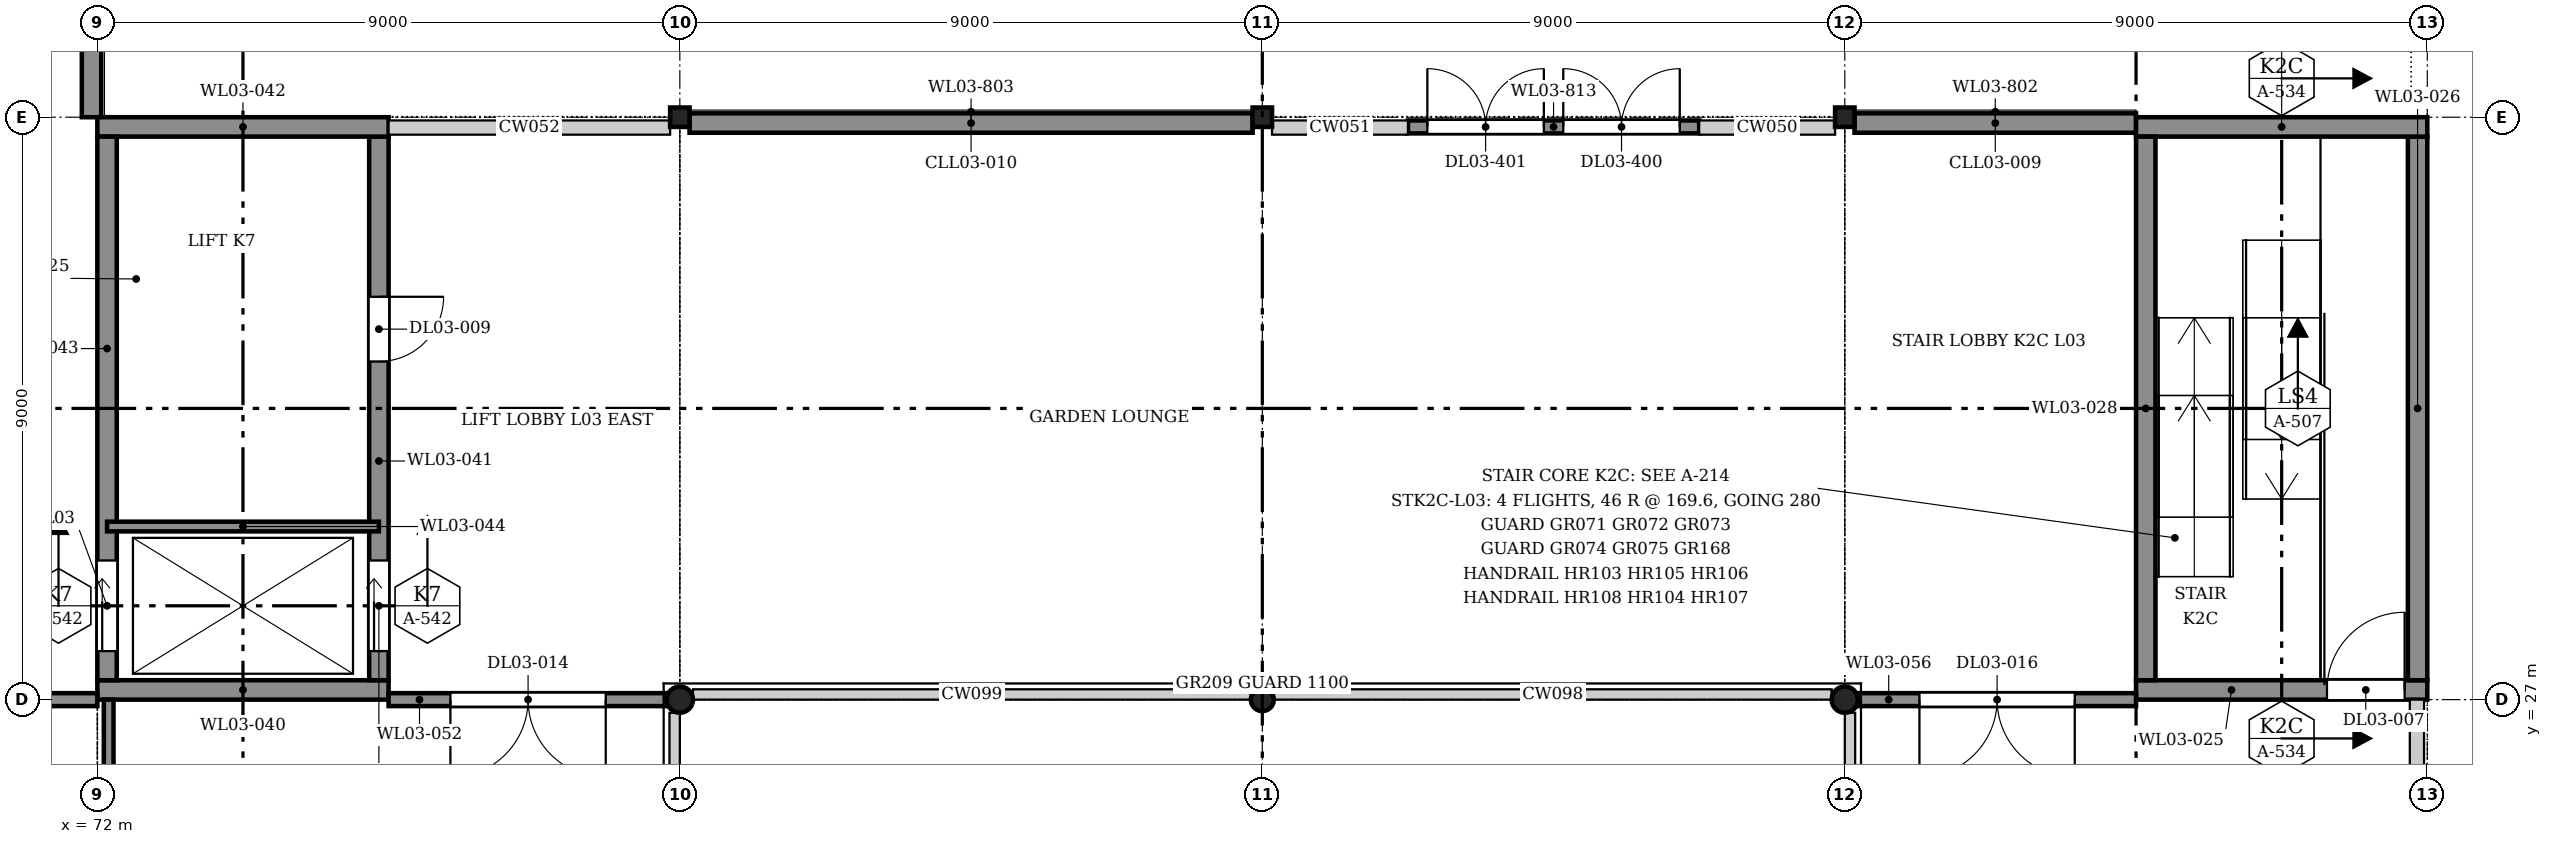
"""IFC4 building model, lengths in metres.
Left out: names, types, materials, properties, quantities, classifications, styles, units other than length and angle.
Written with IfcOpenShell. Run it as: python <this file> out.ifc"""

import sys

from ifc_helpers import new_model, si_unit, direction, frame, frame_2d, origin, origin_2d, place, context, subcontext, project, spatial, rectangle, hollow_rectangle, hollow_circle, extrude, element, fill, save


model = new_model("IFC4")
c1 = context("Model", 3, precision=1e-05, world=origin(), true_north=direction((0.0, 1.0)))
c2 = subcontext(c1, "Body", "Model", "MODEL_VIEW")
j1 = project(units=[si_unit("LENGTHUNIT", "METRE"), si_unit("PLANEANGLEUNIT", "RADIAN")], contexts=[c1])
p1 = place(None, origin())
s1 = spatial("IfcSite", under=j1, at=p1, CompositionType="ELEMENT")
p2 = place(p1, origin())
s2 = spatial("IfcBuilding", under=s1, at=p2, CompositionType="ELEMENT")
p3 = place(p2, frame((0.0, 0.0, 13.4)))
s3 = spatial("IfcBuildingStorey", under=s2, at=p3, CompositionType="ELEMENT", Elevation=13.4)
p4 = place(p3, frame((81.0, 27.0, 0.0), z_axis=(0.0, 0.0, 1.0), x_axis=(1.0, 0.0, 0.0)))
e1 = element("IfcColumn", 1, at=p4, inside=s3, PredefinedType="COLUMN", context=c2, shape_type="SweptSolid", body=[
    extrude(hollow_circle(Radius=0.203, WallThickness=0.013, at=origin_2d()), origin(), (0.0, 0.0, 1.0), 7.8),
])
p5 = place(p3, frame((90.0, 27.0, 0.0), z_axis=(0.0, 0.0, 1.0), x_axis=(1.0, 0.0, 0.0)))
e2 = element("IfcColumn", 2, at=p5, inside=s3, PredefinedType="COLUMN", context=c2, shape_type="SweptSolid", body=[
    extrude(hollow_circle(Radius=0.178, WallThickness=0.013, at=origin_2d()), origin(), (0.0, 0.0, 1.0), 7.8),
])
p6 = place(p3, frame((99.0, 27.0, 0.0), z_axis=(0.0, 0.0, 1.0), x_axis=(1.0, 0.0, 0.0)))
e3 = element("IfcColumn", 3, at=p6, inside=s3, PredefinedType="COLUMN", context=c2, shape_type="SweptSolid", body=[
    extrude(hollow_circle(Radius=0.203, WallThickness=0.013, at=origin_2d()), origin(), (0.0, 0.0, 1.0), 7.8),
])
p7 = place(p3, frame((81.0, 36.0, 0.0), z_axis=(0.0, 0.0, 1.0), x_axis=(1.0, 0.0, 0.0)))
e4 = element("IfcColumn", 4, at=p7, inside=s3, PredefinedType="COLUMN", context=c2, shape_type="SweptSolid", body=[
    extrude(hollow_rectangle(XDim=0.3, YDim=0.3, WallThickness=0.016, InnerFilletRadius=0.024, OuterFilletRadius=0.04, at=origin_2d()), origin(), (0.0, 0.0, 1.0), 7.8),
])
p8 = place(p3, frame((90.0, 36.0, 0.0), z_axis=(0.0, 0.0, 1.0), x_axis=(1.0, 0.0, 0.0)))
e5 = element("IfcColumn", 5, at=p8, inside=s3, PredefinedType="COLUMN", context=c2, shape_type="SweptSolid", body=[
    extrude(hollow_rectangle(XDim=0.3, YDim=0.3, WallThickness=0.01, InnerFilletRadius=0.015, OuterFilletRadius=0.025, at=origin_2d()), origin(), (0.0, 0.0, 1.0), 7.8),
])
p9 = place(p3, frame((99.0, 36.0, 0.0), z_axis=(0.0, 0.0, 1.0), x_axis=(1.0, 0.0, 0.0)))
e6 = element("IfcColumn", 6, at=p9, inside=s3, PredefinedType="COLUMN", context=c2, shape_type="SweptSolid", body=[
    extrude(hollow_rectangle(XDim=0.3, YDim=0.3, WallThickness=0.016, InnerFilletRadius=0.024, OuterFilletRadius=0.04, at=origin_2d()), origin(), (0.0, 0.0, 1.0), 7.8),
])
p10 = place(p3, frame((99.15, 35.91, 0.0), z_axis=(0.0, 0.0, 1.0), x_axis=(1.0, 0.0, 0.0)))
e7 = element("IfcWall", 7, at=p10, inside=s3, PredefinedType="SOLIDWALL", context=c2, shape_type="SweptSolid", body=[
    extrude(rectangle(XDim=4.35, YDim=0.3, at=frame_2d((2.175, 0.0))), origin(), (0.0, 0.0, 1.0), 6.935),
])
p11 = place(p3, frame((81.15, 35.91, 0.0), z_axis=(0.0, 0.0, 1.0), x_axis=(1.0, 0.0, 0.0)))
e8 = element("IfcWall", 8, at=p11, inside=s3, PredefinedType="SOLIDWALL", context=c2, shape_type="SweptSolid", body=[
    extrude(rectangle(XDim=8.7, YDim=0.3, at=frame_2d((4.35, 0.0))), origin(), (0.0, 0.0, 1.0), 6.935),
])
p12 = place(p3, frame((71.91, 36.0, 0.0), z_axis=(0.0, 0.0, 1.0), x_axis=(0.0, 1.0, 0.0)))
e9 = element("IfcWall", 9, at=p12, inside=s3, PredefinedType="SOLIDWALL", context=c2, shape_type="SweptSolid", body=[
    extrude(rectangle(XDim=4.5, YDim=0.3, at=frame_2d((2.25, 0.0))), origin(), (0.0, 0.0, 1.0), 7.678),
])
p13 = place(p3, frame((92.25, 35.85, 0.0), z_axis=(0.0, 0.0, 1.0), x_axis=(1.0, 0.0, 0.0)))
e10 = element("IfcWall", 10, at=p13, inside=s3, PredefinedType="SOLIDWALL", context=c2, shape_type="SweptSolid", body=[
    extrude(rectangle(XDim=4.5, YDim=0.2, at=frame_2d((2.25, 0.0))), origin(), (0.0, 0.0, 1.0), 7.635),
])
p14 = place(p13, frame((2.4, 0.0, 0.0)))
e11 = element("IfcOpeningElement", 11, at=p14, cuts=e10, PredefinedType="OPENING", context=c2, shape_type="SweptSolid", body=[
    extrude(rectangle(XDim=1.8, YDim=2.4, at=frame_2d((0.9, 1.2))), frame((0.0, 0.11, 0.0), z_axis=(0.0, -1.0, 0.0), x_axis=(1.0, 0.0, 0.0)), (0.0, 0.0, 1.0), 0.22),
])
p15 = place(p13, frame((0.3, 0.0, 0.0)))
e12 = element("IfcOpeningElement", 12, at=p15, cuts=e10, PredefinedType="OPENING", context=c2, shape_type="SweptSolid", body=[
    extrude(rectangle(XDim=1.8, YDim=2.4, at=frame_2d((0.9, 1.2))), frame((0.0, 0.11, 0.0), z_axis=(0.0, -1.0, 0.0), x_axis=(1.0, 0.0, 0.0)), (0.0, 0.0, 1.0), 0.22),
])
p16 = place(p3, frame((103.5, 27.15, 0.0), z_axis=(0.0, 0.0, 1.0), x_axis=(1.0, 0.0, 0.0)))
e13 = element("IfcWall", 13, at=p16, inside=s3, PredefinedType="SOLIDWALL", context=c2, shape_type="SweptSolid", body=[
    extrude(rectangle(XDim=4.5, YDim=0.3, at=frame_2d((2.25, 0.0))), origin(), (0.0, 0.0, 1.0), 7.8),
])
p17 = place(p16, frame((2.95, 0.0, 0.0)))
e14 = element("IfcOpeningElement", 14, at=p17, cuts=e13, PredefinedType="OPENING", context=c2, shape_type="SweptSolid", body=[
    extrude(rectangle(XDim=1.2, YDim=2.1, at=frame_2d((0.6, 1.05))), frame((0.0, 0.16, 0.0), z_axis=(0.0, -1.0, 0.0), x_axis=(1.0, 0.0, 0.0)), (0.0, 0.0, 1.0), 0.32),
])
p18 = place(p3, frame((107.85, 27.3, 0.0), z_axis=(0.0, 0.0, 1.0), x_axis=(0.0, 1.0, 0.0)))
e15 = element("IfcWall", 15, at=p18, inside=s3, PredefinedType="SOLIDWALL", context=c2, shape_type="SweptSolid", body=[
    extrude(rectangle(XDim=8.4, YDim=0.3, at=frame_2d((4.2, 0.0))), origin(), (0.0, 0.0, 1.0), 7.8),
])
p19 = place(p3, frame((103.5, 35.85, 0.0), z_axis=(0.0, 0.0, 1.0), x_axis=(1.0, 0.0, 0.0)))
e16 = element("IfcWall", 16, at=p19, inside=s3, PredefinedType="SOLIDWALL", context=c2, shape_type="SweptSolid", body=[
    extrude(rectangle(XDim=4.5, YDim=0.3, at=frame_2d((2.25, 0.0))), origin(), (0.0, 0.0, 1.0), 7.8),
])
p20 = place(p3, frame((103.65, 27.3, 0.0), z_axis=(0.0, 0.0, 1.0), x_axis=(0.0, 1.0, 0.0)))
e17 = element("IfcWall", 17, at=p20, inside=s3, PredefinedType="SOLIDWALL", context=c2, shape_type="SweptSolid", body=[
    extrude(rectangle(XDim=8.4, YDim=0.3, at=frame_2d((4.2, 0.0))), origin(), (0.0, 0.0, 1.0), 7.8),
])
p21 = place(p3, frame((72.0, 27.15, 0.0), z_axis=(0.0, 0.0, 1.0), x_axis=(1.0, 0.0, 0.0)))
e18 = element("IfcWall", 18, at=p21, inside=s3, PredefinedType="SOLIDWALL", context=c2, shape_type="SweptSolid", body=[
    extrude(rectangle(XDim=4.5, YDim=0.3, at=frame_2d((2.25, 0.0))), origin(), (0.0, 0.0, 1.0), 7.8),
])
p22 = place(p3, frame((76.35, 27.3, 0.0), z_axis=(0.0, 0.0, 1.0), x_axis=(0.0, 1.0, 0.0)))
e19 = element("IfcWall", 19, at=p22, inside=s3, PredefinedType="SOLIDWALL", context=c2, shape_type="SweptSolid", body=[
    extrude(rectangle(XDim=8.4, YDim=0.3, at=frame_2d((4.2, 0.0))), origin(), (0.0, 0.0, 1.0), 7.8),
])
p23 = place(p22, frame((0.45, 0.0, 0.0)))
e20 = element("IfcOpeningElement", 20, at=p23, cuts=e19, PredefinedType="OPENING", context=c2, shape_type="SweptSolid", body=[
    extrude(rectangle(XDim=1.4, YDim=2.1, at=frame_2d((0.7, 1.05))), frame((0.0, 0.16, 0.0), z_axis=(0.0, -1.0, 0.0), x_axis=(1.0, 0.0, 0.0)), (0.0, 0.0, 1.0), 0.32),
])
p24 = place(p22, frame((4.925, 0.0, 0.0)))
e21 = element("IfcOpeningElement", 21, at=p24, cuts=e19, PredefinedType="OPENING", context=c2, shape_type="SweptSolid", body=[
    extrude(rectangle(XDim=1.0, YDim=2.1, at=frame_2d((0.5, 1.05))), frame((0.0, 0.16, 0.0), z_axis=(0.0, -1.0, 0.0), x_axis=(1.0, 0.0, 0.0)), (0.0, 0.0, 1.0), 0.32),
])
p25 = place(p3, frame((72.0, 35.85, 0.0), z_axis=(0.0, 0.0, 1.0), x_axis=(1.0, 0.0, 0.0)))
e22 = element("IfcWall", 22, at=p25, inside=s3, PredefinedType="SOLIDWALL", context=c2, shape_type="SweptSolid", body=[
    extrude(rectangle(XDim=4.5, YDim=0.3, at=frame_2d((2.25, 0.0))), origin(), (0.0, 0.0, 1.0), 7.8),
])
p26 = place(p3, frame((72.15, 27.3, 0.0), z_axis=(0.0, 0.0, 1.0), x_axis=(0.0, 1.0, 0.0)))
e23 = element("IfcWall", 23, at=p26, inside=s3, PredefinedType="SOLIDWALL", context=c2, shape_type="SweptSolid", body=[
    extrude(rectangle(XDim=8.4, YDim=0.3, at=frame_2d((4.2, 0.0))), origin(), (0.0, 0.0, 1.0), 7.8),
])
p27 = place(p26, frame((0.45, 0.0, 0.0)))
e24 = element("IfcOpeningElement", 24, at=p27, cuts=e23, PredefinedType="OPENING", context=c2, shape_type="SweptSolid", body=[
    extrude(rectangle(XDim=1.4, YDim=2.1, at=frame_2d((0.7, 1.05))), frame((0.0, 0.16, 0.0), z_axis=(0.0, -1.0, 0.0), x_axis=(1.0, 0.0, 0.0)), (0.0, 0.0, 1.0), 0.32),
])
p28 = place(p3, frame((72.15, 29.675, 0.0), z_axis=(0.0, 0.0, 1.0), x_axis=(1.0, 0.0, 0.0)))
e25 = element("IfcWall", 25, at=p28, inside=s3, PredefinedType="SOLIDWALL", context=c2, shape_type="SweptSolid", body=[
    extrude(rectangle(XDim=4.2, YDim=0.15, at=frame_2d((2.1, 0.0))), origin(), (0.0, 0.0, 1.0), 7.8),
])
p29 = place(p3, frame((63.153, 27.0, 0.0), z_axis=(0.0, 0.0, 1.0), x_axis=(1.0, 0.0, 0.0)))
e26 = element("IfcWall", 26, at=p29, inside=s3, PredefinedType="PARTITIONING", context=c2, shape_type="SweptSolid", body=[
    extrude(rectangle(XDim=8.847, YDim=0.2, at=frame_2d((4.424, 0.0))), origin(), (0.0, 0.0, 1.0), 7.232),
])
p30 = place(p29, frame((3.25, 0.0, 0.0)))
e27 = element("IfcOpeningElement", 27, at=p30, cuts=e26, PredefinedType="OPENING", context=c2, shape_type="SweptSolid", body=[
    extrude(rectangle(XDim=2.4, YDim=2.4, at=frame_2d((1.2, 1.2))), frame((0.0, 0.11, 0.0), z_axis=(0.0, -1.0, 0.0), x_axis=(1.0, 0.0, 0.0)), (0.0, 0.0, 1.0), 0.22),
])
p31 = place(p3, frame((72.175, 22.5, 0.0), z_axis=(0.0, 0.0, 1.0), x_axis=(0.0, 1.0, 0.0)))
e28 = element("IfcWall", 28, at=p31, inside=s3, PredefinedType="PARTITIONING", context=c2, shape_type="SweptSolid", body=[
    extrude(rectangle(XDim=4.5, YDim=0.15, at=frame_2d((2.25, 0.0))), origin(), (0.0, 0.0, 1.0), 7.635),
])
p32 = place(p3, frame((76.5, 27.0, 0.0), z_axis=(0.0, 0.0, 1.0), x_axis=(1.0, 0.0, 0.0)))
e29 = element("IfcWall", 29, at=p32, inside=s3, PredefinedType="PARTITIONING", context=c2, shape_type="SweptSolid", body=[
    extrude(rectangle(XDim=4.297, YDim=0.2, at=frame_2d((2.148, 0.0))), origin(), (0.0, 0.0, 1.0), 7.175),
])
p33 = place(p32, frame((0.955, 0.0, 0.0)))
e30 = element("IfcOpeningElement", 30, at=p33, cuts=e29, PredefinedType="OPENING", context=c2, shape_type="SweptSolid", body=[
    extrude(rectangle(XDim=2.4, YDim=2.4, at=frame_2d((1.2, 1.2))), frame((0.0, 0.11, 0.0), z_axis=(0.0, -1.0, 0.0), x_axis=(1.0, 0.0, 0.0)), (0.0, 0.0, 1.0), 0.22),
])
p34 = place(p3, frame((99.203, 27.0, 0.0), z_axis=(0.0, 0.0, 1.0), x_axis=(1.0, 0.0, 0.0)))
e31 = element("IfcWall", 31, at=p34, inside=s3, PredefinedType="PARTITIONING", context=c2, shape_type="SweptSolid", body=[
    extrude(rectangle(XDim=4.297, YDim=0.2, at=frame_2d((2.148, 0.0))), origin(), (0.0, 0.0, 1.0), 7.175),
])
p35 = place(p34, frame((0.95, 0.0, 0.0)))
e32 = element("IfcOpeningElement", 32, at=p35, cuts=e31, PredefinedType="OPENING", context=c2, shape_type="SweptSolid", body=[
    extrude(rectangle(XDim=2.4, YDim=2.4, at=frame_2d((1.2, 1.2))), frame((0.0, 0.11, 0.0), z_axis=(0.0, -1.0, 0.0), x_axis=(1.0, 0.0, 0.0)), (0.0, 0.0, 1.0), 0.22),
])
p36 = place(p14, origin())
e33 = element("IfcDoor", 33, at=p36, inside=s3, OperationType="DOUBLE_DOOR_SINGLE_SWING", PredefinedType="DOOR", context=c2, shape_type="SweptSolid", body=[
    extrude(rectangle(XDim=1.8, YDim=2.4, at=frame_2d((0.9, 1.2))), frame((0.0, 0.025, 0.0), z_axis=(0.0, -1.0, 0.0), x_axis=(1.0, 0.0, 0.0)), (0.0, 0.0, 1.0), 0.05),
])
fill(e11, e33)
p37 = place(p15, origin())
e34 = element("IfcDoor", 34, at=p37, inside=s3, OperationType="DOUBLE_DOOR_SINGLE_SWING", PredefinedType="DOOR", context=c2, shape_type="SweptSolid", body=[
    extrude(rectangle(XDim=1.8, YDim=2.4, at=frame_2d((0.9, 1.2))), frame((0.0, 0.025, 0.0), z_axis=(0.0, -1.0, 0.0), x_axis=(1.0, 0.0, 0.0)), (0.0, 0.0, 1.0), 0.05),
])
fill(e12, e34)
p38 = place(p2, frame((0.0, 0.0, 21.2)))
p39 = place(p38, frame((27.0, 27.125, -0.146), z_axis=(0.0, 0.0, 1.0), x_axis=(1.0, 0.0, 0.0)))
p40 = place(p39, frame((40.95, 0.0, 0.15)))
p41 = place(p40, origin())
e35 = element("IfcWindow", 35, at=p41, inside=s3, PartitioningType="SINGLE_PANEL", PredefinedType="SKYLIGHT", context=c2, shape_type="SweptSolid", body=[
    extrude(rectangle(XDim=3.6, YDim=1.0, at=frame_2d((1.8, 0.5))), frame((0.0, 0.03, 0.0), z_axis=(0.0, -1.0, 0.0), x_axis=(1.0, 0.0, 0.0)), (0.0, 0.0, 1.0), 0.06),
])
p42 = place(p38, frame((62.85, 36.125, -0.122), z_axis=(0.0, 0.0, 1.0), x_axis=(1.0, 0.0, 0.0)))
p43 = place(p42, frame((5.1, 0.0, 0.15)))
p44 = place(p43, origin())
e36 = element("IfcWindow", 36, at=p44, inside=s3, PartitioningType="SINGLE_PANEL", PredefinedType="SKYLIGHT", context=c2, shape_type="SweptSolid", body=[
    extrude(rectangle(XDim=3.6, YDim=1.0, at=frame_2d((1.8, 0.5))), frame((0.0, 0.03, 0.0), z_axis=(0.0, -1.0, 0.0), x_axis=(1.0, 0.0, 0.0)), (0.0, 0.0, 1.0), 0.06),
])
p45 = place(p17, origin())
e37 = element("IfcDoor", 37, at=p45, inside=s3, OperationType="SINGLE_SWING_LEFT", PredefinedType="DOOR", context=c2, shape_type="SweptSolid", body=[
    extrude(rectangle(XDim=1.2, YDim=2.1, at=frame_2d((0.6, 1.05))), frame((0.0, 0.025, 0.0), z_axis=(0.0, -1.0, 0.0), x_axis=(1.0, 0.0, 0.0)), (0.0, 0.0, 1.0), 0.05),
])
fill(e14, e37)
p46 = place(p23, origin())
e38 = element("IfcDoor", 38, at=p46, inside=s3, OperationType="SLIDING_TO_LEFT", PredefinedType="DOOR", context=c2, shape_type="SweptSolid", body=[
    extrude(rectangle(XDim=1.4, YDim=2.1, at=frame_2d((0.7, 1.05))), frame((0.0, 0.025, 0.0), z_axis=(0.0, -1.0, 0.0), x_axis=(1.0, 0.0, 0.0)), (0.0, 0.0, 1.0), 0.05),
])
fill(e20, e38)
p47 = place(p27, origin())
e39 = element("IfcDoor", 39, at=p47, inside=s3, OperationType="SLIDING_TO_RIGHT", PredefinedType="DOOR", context=c2, shape_type="SweptSolid", body=[
    extrude(rectangle(XDim=1.4, YDim=2.1, at=frame_2d((0.7, 1.05))), frame((0.0, 0.025, 0.0), z_axis=(0.0, -1.0, 0.0), x_axis=(1.0, 0.0, 0.0)), (0.0, 0.0, 1.0), 0.05),
])
fill(e24, e39)
p48 = place(p24, frame((1.0, 0.0, 0.0), z_axis=(0.0, 0.0, 1.0), x_axis=(-1.0, 0.0, 0.0)))
e40 = element("IfcDoor", 40, at=p48, inside=s3, OperationType="SINGLE_SWING_RIGHT", PredefinedType="DOOR", context=c2, shape_type="SweptSolid", body=[
    extrude(rectangle(XDim=1.0, YDim=2.1, at=frame_2d((0.5, 1.05))), frame((0.0, 0.025, 0.0), z_axis=(0.0, -1.0, 0.0), x_axis=(1.0, 0.0, 0.0)), (0.0, 0.0, 1.0), 0.05),
])
fill(e21, e40)
p49 = place(p33, frame((2.4, 0.0, 0.0), z_axis=(0.0, 0.0, 1.0), x_axis=(-1.0, 0.0, 0.0)))
e41 = element("IfcDoor", 41, at=p49, inside=s3, OperationType="DOUBLE_DOOR_SINGLE_SWING", PredefinedType="DOOR", context=c2, shape_type="SweptSolid", body=[
    extrude(rectangle(XDim=2.4, YDim=2.4, at=frame_2d((1.2, 1.2))), frame((0.0, 0.025, 0.0), z_axis=(0.0, -1.0, 0.0), x_axis=(1.0, 0.0, 0.0)), (0.0, 0.0, 1.0), 0.05),
])
fill(e30, e41)
p50 = place(p35, frame((2.4, 0.0, 0.0), z_axis=(0.0, 0.0, 1.0), x_axis=(-1.0, 0.0, 0.0)))
e42 = element("IfcDoor", 42, at=p50, inside=s3, OperationType="DOUBLE_DOOR_SINGLE_SWING", PredefinedType="DOOR", context=c2, shape_type="SweptSolid", body=[
    extrude(rectangle(XDim=2.4, YDim=2.4, at=frame_2d((1.2, 1.2))), frame((0.0, 0.025, 0.0), z_axis=(0.0, -1.0, 0.0), x_axis=(1.0, 0.0, 0.0)), (0.0, 0.0, 1.0), 0.05),
])
fill(e32, e42)
save(model, sys.argv[1])
